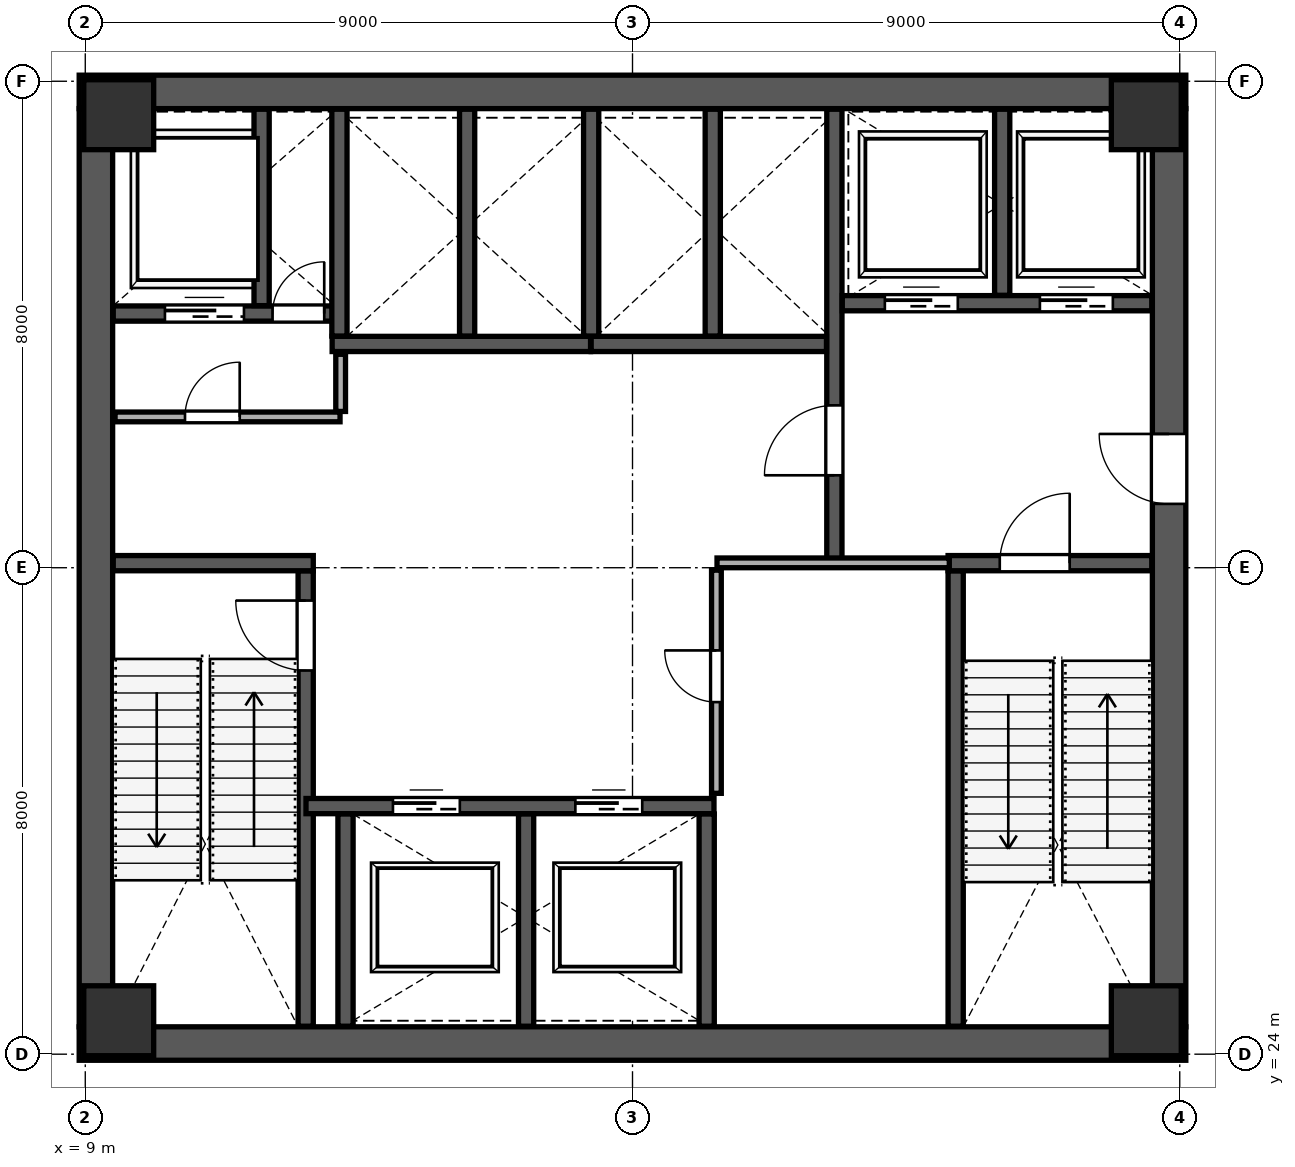
"""IFC4 building model, lengths in metres.
Left out: names, types, materials, properties, quantities, classifications, styles, units other than length and angle.
Written with IfcOpenShell. Run it as: python <this file> out.ifc"""

import sys

from ifc_helpers import new_model, si_unit, direction, frame, frame_2d, origin, origin_2d, place, context, subcontext, project, spatial, rectangle, extrude, source, transform, mapped, element, fill, save


model = new_model("IFC4")
c1 = context("Model", 3, precision=1e-05, world=origin(), true_north=direction((0.0, 1.0)))
c2 = subcontext(c1, "Body", "Model", "MODEL_VIEW")
j1 = project(units=[si_unit("LENGTHUNIT", "METRE"), si_unit("PLANEANGLEUNIT", "RADIAN")], contexts=[c1])
p1 = place(None, origin())
s1 = spatial("IfcSite", under=j1, at=p1, CompositionType="ELEMENT")
p2 = place(p1, origin())
s2 = spatial("IfcBuilding", under=s1, at=p2, CompositionType="ELEMENT")
p3 = place(p2, frame((0.0, 0.0, 37.6)))
s3 = spatial("IfcBuildingStorey", under=s2, at=p3, CompositionType="ELEMENT", Elevation=37.6)
m1 = source(origin(), c2, "Body", "SweptSolid", [
    extrude(rectangle(XDim=1.15, YDim=1.15, at=origin_2d()), origin(), (0.0, 0.0, 1.0), 4.798),
])
for number, where, z_axis, x_axis in (
    (1, (9.55, 24.55, 0.001), (0.0, 0.0, 1.0), (1.0, 0.0, 0.0)),
    (2, (26.45, 24.55, 0.001), (0.0, 0.0, 1.0), (1.0, 0.0, 0.0)),
    (3, (9.55, 39.45, 0.001), (0.0, 0.0, 1.0), (1.0, 0.0, 0.0)),
    (4, (26.45, 39.45, 0.001), (0.0, 0.0, 1.0), (1.0, 0.0, 0.0)),
):
    element("IfcColumn", number, at=place(p3, frame(where, z_axis=z_axis, x_axis=x_axis)), inside=s3, PredefinedType="COLUMN", context=c2, shape_type="MappedRepresentation", body=[
        mapped(m1, transform((0.0, 0.0, 0.0), scale=1.0)),
    ])
p4 = place(p3, frame((9.175, 24.45, 0.0), z_axis=(0.0, 0.0, 1.0), x_axis=(0.0, 1.0, 0.0)))
e5 = element("IfcWall", 5, at=p4, inside=s3, PredefinedType="SHEAR", context=c2, shape_type="SweptSolid", body=[
    extrude(rectangle(XDim=15.1, YDim=0.55, at=frame_2d((7.55, 0.0))), origin(), (0.0, 0.0, 1.0), 4.56),
])
p5 = place(p3, frame((26.825, 24.45, 0.0), z_axis=(0.0, 0.0, 1.0), x_axis=(0.0, 1.0, 0.0)))
e6 = element("IfcWall", 6, at=p5, inside=s3, PredefinedType="SHEAR", context=c2, shape_type="SweptSolid", body=[
    extrude(rectangle(XDim=15.1, YDim=0.55, at=frame_2d((7.55, 0.0))), origin(), (0.0, 0.0, 1.0), 4.56),
])
p6 = place(p5, frame((8.6, 0.0, 0.0)))
e7 = element("IfcOpeningElement", 7, at=p6, cuts=e6, PredefinedType="OPENING", context=c2, shape_type="SweptSolid", body=[
    extrude(rectangle(XDim=1.15, YDim=2.2, at=frame_2d((0.575, 1.1))), frame((0.0, 0.285, 0.0), z_axis=(0.0, -1.0, 0.0), x_axis=(1.0, 0.0, 0.0)), (0.0, 0.0, 1.0), 0.57),
])
for number, where, z_axis, x_axis in (
    (8, (8.9, 24.175, 0.0), (0.0, 0.0, 1.0), (1.0, 0.0, 0.0)),
    (9, (8.9, 39.825, 0.0), (0.0, 0.0, 1.0), (1.0, 0.0, 0.0)),
):
    element("IfcWall", number, at=place(p3, frame(where, z_axis=z_axis, x_axis=x_axis)), inside=s3, PredefinedType="SHEAR", context=c2, shape_type="SweptSolid", body=[
        extrude(rectangle(XDim=18.2, YDim=0.55, at=frame_2d((9.1, 0.0))), origin(), (0.0, 0.0, 1.0), 4.56),
    ])
p7 = place(p3, frame((12.625, 24.46, 0.0), z_axis=(0.0, 0.0, 1.0), x_axis=(0.0, 1.0, 0.0)))
e10 = element("IfcWall", 10, at=p7, inside=s3, PredefinedType="SHEAR", context=c2, shape_type="SweptSolid", body=[
    extrude(rectangle(XDim=7.49, YDim=0.25, at=frame_2d((3.745, 0.0))), origin(), (0.0, 0.0, 1.0), 4.56),
])
p8 = place(p7, frame((5.85, 0.0, 0.0)))
e11 = element("IfcOpeningElement", 11, at=p8, cuts=e10, PredefinedType="OPENING", context=c2, shape_type="SweptSolid", body=[
    extrude(rectangle(XDim=1.15, YDim=2.2, at=frame_2d((0.575, 1.1))), frame((0.0, 0.135, 0.0), z_axis=(0.0, -1.0, 0.0), x_axis=(1.0, 0.0, 0.0)), (0.0, 0.0, 1.0), 0.27),
])
p9 = place(p3, frame((9.46, 32.075, 0.0), z_axis=(0.0, 0.0, 1.0), x_axis=(1.0, 0.0, 0.0)))
e12 = element("IfcWall", 12, at=p9, inside=s3, PredefinedType="SHEAR", context=c2, shape_type="SweptSolid", body=[
    extrude(rectangle(XDim=3.29, YDim=0.25, at=frame_2d((1.645, 0.0))), origin(), (0.0, 0.0, 1.0), 4.56),
])
p10 = place(p3, frame((23.315, 24.46, 0.0), z_axis=(0.0, 0.0, 1.0), x_axis=(0.0, 1.0, 0.0)))
e13 = element("IfcWall", 13, at=p10, inside=s3, PredefinedType="SHEAR", context=c2, shape_type="SweptSolid", body=[
    extrude(rectangle(XDim=7.49, YDim=0.25, at=frame_2d((3.745, 0.0))), origin(), (0.0, 0.0, 1.0), 4.56),
])
p11 = place(p3, frame((23.19, 32.075, 0.0), z_axis=(0.0, 0.0, 1.0), x_axis=(1.0, 0.0, 0.0)))
e14 = element("IfcWall", 14, at=p11, inside=s3, PredefinedType="SHEAR", context=c2, shape_type="SweptSolid", body=[
    extrude(rectangle(XDim=3.35, YDim=0.25, at=frame_2d((1.675, 0.0))), origin(), (0.0, 0.0, 1.0), 4.56),
])
p12 = place(p11, frame((0.85, 0.0, 0.0)))
e15 = element("IfcOpeningElement", 15, at=p12, cuts=e14, PredefinedType="OPENING", context=c2, shape_type="SweptSolid", body=[
    extrude(rectangle(XDim=1.15, YDim=2.2, at=frame_2d((0.575, 1.1))), frame((0.0, 0.135, 0.0), z_axis=(0.0, -1.0, 0.0), x_axis=(1.0, 0.0, 0.0)), (0.0, 0.0, 1.0), 0.27),
])
p13 = place(p3, frame((21.32, 32.12, 0.0), z_axis=(0.0, 0.0, 1.0), x_axis=(0.0, 1.0, 0.0)))
e16 = element("IfcWall", 16, at=p13, inside=s3, PredefinedType="SHEAR", context=c2, shape_type="SweptSolid", body=[
    extrude(rectangle(XDim=7.42, YDim=0.25, at=frame_2d((3.71, 0.0))), origin(), (0.0, 0.0, 1.0), 4.56),
])
p14 = place(p13, frame((1.4, 0.0, 0.0)))
e17 = element("IfcOpeningElement", 17, at=p14, cuts=e16, PredefinedType="OPENING", context=c2, shape_type="SweptSolid", body=[
    extrude(rectangle(XDim=1.15, YDim=2.2, at=frame_2d((0.575, 1.1))), frame((0.0, 0.135, 0.0), z_axis=(0.0, -1.0, 0.0), x_axis=(1.0, 0.0, 0.0)), (0.0, 0.0, 1.0), 0.27),
])
p15 = place(p3, frame((9.46, 36.18, 0.0), z_axis=(0.0, 0.0, 1.0), x_axis=(1.0, 0.0, 0.0)))
e18 = element("IfcWall", 18, at=p15, inside=s3, PredefinedType="SHEAR", context=c2, shape_type="SweptSolid", body=[
    extrude(rectangle(XDim=3.79, YDim=0.25, at=frame_2d((1.895, 0.0))), origin(), (0.0, 0.0, 1.0), 4.56),
])
p16 = place(p15, frame((2.62, 0.0, 0.0)))
e19 = element("IfcOpeningElement", 19, at=p16, cuts=e18, PredefinedType="OPENING", context=c2, shape_type="SweptSolid", body=[
    extrude(rectangle(XDim=0.85, YDim=2.1, at=frame_2d((0.425, 1.05))), frame((0.0, 0.135, 0.0), z_axis=(0.0, -1.0, 0.0), x_axis=(1.0, 0.0, 0.0)), (0.0, 0.0, 1.0), 0.27),
])
p17 = place(p15, frame((0.85, 0.0, 0.0)))
e20 = element("IfcOpeningElement", 20, at=p17, cuts=e18, PredefinedType="OPENING", context=c2, shape_type="SweptSolid", body=[
    extrude(rectangle(XDim=1.3, YDim=2.25, at=frame_2d((0.65, 1.125))), frame((0.0, 0.135, 0.0), z_axis=(0.0, -1.0, 0.0), x_axis=(1.0, 0.0, 0.0)), (0.0, 0.0, 1.0), 0.27),
])
p18 = place(p3, frame((11.9, 36.31, 0.0), z_axis=(0.0, 0.0, 1.0), x_axis=(0.0, 1.0, 0.0)))
e21 = element("IfcWall", 21, at=p18, inside=s3, PredefinedType="SHEAR", context=c2, shape_type="SweptSolid", body=[
    extrude(rectangle(XDim=3.23, YDim=0.25, at=frame_2d((1.615, 0.0))), origin(), (0.0, 0.0, 1.0), 4.56),
])
p19 = place(p3, frame((21.45, 36.35, 0.0), z_axis=(0.0, 0.0, 1.0), x_axis=(1.0, 0.0, 0.0)))
e22 = element("IfcWall", 22, at=p19, inside=s3, PredefinedType="SHEAR", context=c2, shape_type="SweptSolid", body=[
    extrude(rectangle(XDim=5.09, YDim=0.25, at=frame_2d((2.545, 0.0))), origin(), (0.0, 0.0, 1.0), 4.56),
])
p20 = place(p19, frame((0.7, 0.0, 0.0)))
e23 = element("IfcOpeningElement", 23, at=p20, cuts=e22, PredefinedType="OPENING", context=c2, shape_type="SweptSolid", body=[
    extrude(rectangle(XDim=1.2, YDim=2.2, at=frame_2d((0.6, 1.1))), frame((0.0, 0.135, 0.0), z_axis=(0.0, -1.0, 0.0), x_axis=(1.0, 0.0, 0.0)), (0.0, 0.0, 1.0), 0.27),
])
p21 = place(p19, frame((3.25, 0.0, 0.0)))
e24 = element("IfcOpeningElement", 24, at=p21, cuts=e22, PredefinedType="OPENING", context=c2, shape_type="SweptSolid", body=[
    extrude(rectangle(XDim=1.2, YDim=2.2, at=frame_2d((0.6, 1.1))), frame((0.0, 0.135, 0.0), z_axis=(0.0, -1.0, 0.0), x_axis=(1.0, 0.0, 0.0)), (0.0, 0.0, 1.0), 0.27),
])
p22 = place(p3, frame((24.08, 36.48, 0.0), z_axis=(0.0, 0.0, 1.0), x_axis=(0.0, 1.0, 0.0)))
e25 = element("IfcWall", 25, at=p22, inside=s3, PredefinedType="SHEAR", context=c2, shape_type="SweptSolid", body=[
    extrude(rectangle(XDim=3.06, YDim=0.25, at=frame_2d((1.53, 0.0))), origin(), (0.0, 0.0, 1.0), 4.56),
])
p23 = place(p3, frame((12.63, 28.08, 0.0), z_axis=(0.0, 0.0, 1.0), x_axis=(1.0, 0.0, 0.0)))
e26 = element("IfcWall", 26, at=p23, inside=s3, PredefinedType="SHEAR", context=c2, shape_type="SweptSolid", body=[
    extrude(rectangle(XDim=6.71, YDim=0.25, at=frame_2d((3.355, 0.0))), origin(), (0.0, 0.0, 1.0), 4.56),
])
p24 = place(p23, frame((1.43, 0.0, 0.0)))
e27 = element("IfcOpeningElement", 27, at=p24, cuts=e26, PredefinedType="OPENING", context=c2, shape_type="SweptSolid", body=[
    extrude(rectangle(XDim=1.1, YDim=2.2, at=frame_2d((0.55, 1.1))), frame((0.0, 0.135, 0.0), z_axis=(0.0, -1.0, 0.0), x_axis=(1.0, 0.0, 0.0)), (0.0, 0.0, 1.0), 0.27),
])
p25 = place(p23, frame((4.43, 0.0, 0.0)))
e28 = element("IfcOpeningElement", 28, at=p25, cuts=e26, PredefinedType="OPENING", context=c2, shape_type="SweptSolid", body=[
    extrude(rectangle(XDim=1.1, YDim=2.2, at=frame_2d((0.55, 1.1))), frame((0.0, 0.135, 0.0), z_axis=(0.0, -1.0, 0.0), x_axis=(1.0, 0.0, 0.0)), (0.0, 0.0, 1.0), 0.27),
])
for number, where, z_axis, x_axis in (
    (29, (13.28, 24.46, 0.0), (0.0, 0.0, 1.0), (0.0, 1.0, 0.0)),
    (30, (16.25, 24.46, 0.0), (0.0, 0.0, 1.0), (0.0, 1.0, 0.0)),
    (31, (19.22, 24.46, 0.0), (0.0, 0.0, 1.0), (0.0, 1.0, 0.0)),
):
    element("IfcWall", number, at=place(p3, frame(where, z_axis=z_axis, x_axis=x_axis)), inside=s3, PredefinedType="SHEAR", context=c2, shape_type="SweptSolid", body=[
        extrude(rectangle(XDim=3.49, YDim=0.25, at=frame_2d((1.745, 0.0))), origin(), (0.0, 0.0, 1.0), 4.56),
    ])
p26 = place(p3, frame((13.06, 35.68, 0.0), z_axis=(0.0, 0.0, 1.0), x_axis=(1.0, 0.0, 0.0)))
e32 = element("IfcWall", 32, at=p26, inside=s3, PredefinedType="SHEAR", context=c2, shape_type="SweptSolid", body=[
    extrude(rectangle(XDim=4.25, YDim=0.25, at=frame_2d((2.125, 0.0))), origin(), (0.0, 0.0, 1.0), 4.56),
])
for number, where, z_axis, x_axis in (
    (33, (13.18, 35.81, 0.0), (0.0, 0.0, 1.0), (0.0, 1.0, 0.0)),
    (34, (15.28, 35.81, 0.0), (0.0, 0.0, 1.0), (0.0, 1.0, 0.0)),
):
    element("IfcWall", number, at=place(p3, frame(where, z_axis=z_axis, x_axis=x_axis)), inside=s3, PredefinedType="SHEAR", context=c2, shape_type="SweptSolid", body=[
        extrude(rectangle(XDim=3.73, YDim=0.25, at=frame_2d((1.865, 0.0))), origin(), (0.0, 0.0, 1.0), 4.56),
    ])
p27 = place(p3, frame((17.32, 35.68, 0.0), z_axis=(0.0, 0.0, 1.0), x_axis=(1.0, 0.0, 0.0)))
e35 = element("IfcWall", 35, at=p27, inside=s3, PredefinedType="SHEAR", context=c2, shape_type="SweptSolid", body=[
    extrude(rectangle(XDim=3.87, YDim=0.25, at=frame_2d((1.935, 0.0))), origin(), (0.0, 0.0, 1.0), 4.56),
])
for number, where, z_axis, x_axis in (
    (36, (17.32, 35.81, 0.0), (0.0, 0.0, 1.0), (0.0, 1.0, 0.0)),
    (37, (19.32, 35.81, 0.0), (0.0, 0.0, 1.0), (0.0, 1.0, 0.0)),
):
    element("IfcWall", number, at=place(p3, frame(where, z_axis=z_axis, x_axis=x_axis)), inside=s3, PredefinedType="SHEAR", context=c2, shape_type="SweptSolid", body=[
        extrude(rectangle(XDim=3.73, YDim=0.25, at=frame_2d((1.865, 0.0))), origin(), (0.0, 0.0, 1.0), 4.56),
    ])
p28 = place(p3, frame((9.49, 34.48, 0.0), z_axis=(0.0, 0.0, 1.0), x_axis=(1.0, 0.0, 0.0)))
e38 = element("IfcWall", 38, at=p28, inside=s3, PredefinedType="PARTITIONING", context=c2, shape_type="SweptSolid", body=[
    extrude(rectangle(XDim=3.7, YDim=0.16, at=frame_2d((1.85, 0.0))), origin(), (0.0, 0.0, 1.0), 4.56),
])
p29 = place(p28, frame((1.15, 0.0, 0.0)))
e39 = element("IfcOpeningElement", 39, at=p29, cuts=e38, PredefinedType="OPENING", context=c2, shape_type="SweptSolid", body=[
    extrude(rectangle(XDim=0.9, YDim=2.15, at=frame_2d((0.45, 1.075))), frame((0.0, 0.09, 0.0), z_axis=(0.0, -1.0, 0.0), x_axis=(1.0, 0.0, 0.0)), (0.0, 0.0, 1.0), 0.18),
])
p30 = place(p3, frame((13.2, 34.57, 0.0), z_axis=(0.0, 0.0, 1.0), x_axis=(0.0, 1.0, 0.0)))
e40 = element("IfcWall", 40, at=p30, inside=s3, PredefinedType="PARTITIONING", context=c2, shape_type="SweptSolid", body=[
    extrude(rectangle(XDim=0.94, YDim=0.16, at=frame_2d((0.47, 0.0))), origin(), (0.0, 0.0, 1.0), 4.56),
])
p31 = place(p3, frame((19.39, 32.08, 0.0), z_axis=(0.0, 0.0, 1.0), x_axis=(1.0, 0.0, 0.0)))
e41 = element("IfcWall", 41, at=p31, inside=s3, PredefinedType="PARTITIONING", context=c2, shape_type="SweptSolid", body=[
    extrude(rectangle(XDim=3.82, YDim=0.16, at=frame_2d((1.91, 0.0))), origin(), (0.0, 0.0, 1.0), 4.56),
])
p32 = place(p3, frame((19.38, 28.29, 0.0), z_axis=(0.0, 0.0, 1.0), x_axis=(0.0, 1.0, 0.0)))
e42 = element("IfcWall", 42, at=p32, inside=s3, PredefinedType="PARTITIONING", context=c2, shape_type="SweptSolid", body=[
    extrude(rectangle(XDim=3.67, YDim=0.16, at=frame_2d((1.835, 0.0))), origin(), (0.0, 0.0, 1.0), 4.56),
])
p33 = place(p32, frame((1.5, 0.0, 0.0)))
e43 = element("IfcOpeningElement", 43, at=p33, cuts=e42, PredefinedType="OPENING", context=c2, shape_type="SweptSolid", body=[
    extrude(rectangle(XDim=0.85, YDim=2.1, at=frame_2d((0.425, 1.05))), frame((0.0, 0.09, 0.0), z_axis=(0.0, -1.0, 0.0), x_axis=(1.0, 0.0, 0.0)), (0.0, 0.0, 1.0), 0.18),
])
m2 = source(origin(), c2, "Body", "SweptSolid", [
    extrude(rectangle(XDim=1.15, YDim=2.2, at=frame_2d((0.575, 1.1))), frame((0.0, 0.025, 0.0), z_axis=(0.0, -1.0, 0.0), x_axis=(1.0, 0.0, 0.0)), (0.0, 0.0, 1.0), 0.05),
])
p34 = place(p8, origin())
e44 = element("IfcDoor", 44, at=p34, inside=s3, OperationType="SINGLE_SWING_RIGHT", PredefinedType="DOOR", context=c2, shape_type="MappedRepresentation", body=[
    mapped(m2, transform((0.0, 0.0, 0.0), scale=1.0)),
])
fill(e11, e44)
m3 = source(origin(), c2, "Body", "SweptSolid", [
    extrude(rectangle(XDim=1.15, YDim=2.2, at=frame_2d((0.575, 1.1))), frame((0.0, 0.025, 0.0), z_axis=(0.0, -1.0, 0.0), x_axis=(1.0, 0.0, 0.0)), (0.0, 0.0, 1.0), 0.05),
])
p35 = place(p14, origin())
e45 = element("IfcDoor", 45, at=p35, inside=s3, OperationType="SINGLE_SWING_LEFT", PredefinedType="DOOR", context=c2, shape_type="MappedRepresentation", body=[
    mapped(m3, transform((0.0, 0.0, 0.0), scale=1.0)),
])
fill(e17, e45)
p36 = place(p12, origin())
e46 = element("IfcDoor", 46, at=p36, inside=s3, OperationType="SINGLE_SWING_RIGHT", PredefinedType="DOOR", context=c2, shape_type="MappedRepresentation", body=[
    mapped(m2, transform((0.0, 0.0, 0.0), scale=1.0)),
])
fill(e15, e46)
p37 = place(p6, origin())
e47 = element("IfcDoor", 47, at=p37, inside=s3, OperationType="SINGLE_SWING_RIGHT", PredefinedType="DOOR", context=c2, shape_type="MappedRepresentation", body=[
    mapped(m3, transform((0.0, 0.0, 0.0), scale=1.0)),
])
fill(e7, e47)
m4 = source(origin(), c2, "Body", "SweptSolid", [
    extrude(rectangle(XDim=0.85, YDim=2.1, at=frame_2d((0.425, 1.05))), frame((0.0, 0.025, 0.0), z_axis=(0.0, -1.0, 0.0), x_axis=(1.0, 0.0, 0.0)), (0.0, 0.0, 1.0), 0.05),
])
p38 = place(p16, origin())
e48 = element("IfcDoor", 48, at=p38, inside=s3, OperationType="SINGLE_SWING_RIGHT", PredefinedType="DOOR", context=c2, shape_type="MappedRepresentation", body=[
    mapped(m4, transform((0.0, 0.0, 0.0), scale=1.0)),
])
fill(e19, e48)
m5 = source(origin(), c2, "Body", "SweptSolid", [
    extrude(rectangle(XDim=1.1, YDim=2.2, at=frame_2d((0.55, 1.1))), frame((0.0, 0.025, 0.0), z_axis=(0.0, -1.0, 0.0), x_axis=(1.0, 0.0, 0.0)), (0.0, 0.0, 1.0), 0.05),
])
p39 = place(p24, origin())
e49 = element("IfcDoor", 49, at=p39, inside=s3, OperationType="SLIDING_TO_LEFT", PredefinedType="DOOR", context=c2, shape_type="MappedRepresentation", body=[
    mapped(m5, transform((0.0, 0.0, 0.0), scale=1.0)),
])
fill(e27, e49)
p40 = place(p25, origin())
e50 = element("IfcDoor", 50, at=p40, inside=s3, OperationType="SLIDING_TO_RIGHT", PredefinedType="DOOR", context=c2, shape_type="MappedRepresentation", body=[
    mapped(m5, transform((0.0, 0.0, 0.0), scale=1.0)),
])
fill(e28, e50)
m6 = source(origin(), c2, "Body", "SweptSolid", [
    extrude(rectangle(XDim=1.2, YDim=2.2, at=frame_2d((0.6, 1.1))), frame((0.0, 0.025, 0.0), z_axis=(0.0, -1.0, 0.0), x_axis=(1.0, 0.0, 0.0)), (0.0, 0.0, 1.0), 0.05),
])
p41 = place(p20, origin())
e51 = element("IfcDoor", 51, at=p41, inside=s3, OperationType="SLIDING_TO_LEFT", PredefinedType="DOOR", context=c2, shape_type="MappedRepresentation", body=[
    mapped(m6, transform((0.0, 0.0, 0.0), scale=1.0)),
])
fill(e23, e51)
p42 = place(p21, origin())
e52 = element("IfcDoor", 52, at=p42, inside=s3, OperationType="SLIDING_TO_RIGHT", PredefinedType="DOOR", context=c2, shape_type="MappedRepresentation", body=[
    mapped(m6, transform((0.0, 0.0, 0.0), scale=1.0)),
])
fill(e24, e52)
m7 = source(origin(), c2, "Body", "SweptSolid", [
    extrude(rectangle(XDim=1.3, YDim=2.25, at=frame_2d((0.65, 1.125))), frame((0.0, 0.025, 0.0), z_axis=(0.0, -1.0, 0.0), x_axis=(1.0, 0.0, 0.0)), (0.0, 0.0, 1.0), 0.05),
])
p43 = place(p17, origin())
e53 = element("IfcDoor", 53, at=p43, inside=s3, OperationType="SLIDING_TO_LEFT", PredefinedType="DOOR", context=c2, shape_type="MappedRepresentation", body=[
    mapped(m7, transform((0.0, 0.0, 0.0), scale=1.0)),
])
fill(e20, e53)
m8 = source(origin(), c2, "Body", "SweptSolid", [
    extrude(rectangle(XDim=0.9, YDim=2.15, at=frame_2d((0.45, 1.075))), frame((0.0, 0.025, 0.0), z_axis=(0.0, -1.0, 0.0), x_axis=(1.0, 0.0, 0.0)), (0.0, 0.0, 1.0), 0.05),
])
p44 = place(p29, origin())
e54 = element("IfcDoor", 54, at=p44, inside=s3, OperationType="SINGLE_SWING_RIGHT", PredefinedType="DOOR", context=c2, shape_type="MappedRepresentation", body=[
    mapped(m8, transform((0.0, 0.0, 0.0), scale=1.0)),
])
fill(e39, e54)
p45 = place(p33, origin())
e55 = element("IfcDoor", 55, at=p45, inside=s3, OperationType="SINGLE_SWING_RIGHT", PredefinedType="DOOR", context=c2, shape_type="MappedRepresentation", body=[
    mapped(m4, transform((0.0, 0.0, 0.0), scale=1.0)),
])
fill(e43, e55)
save(model, sys.argv[1])
